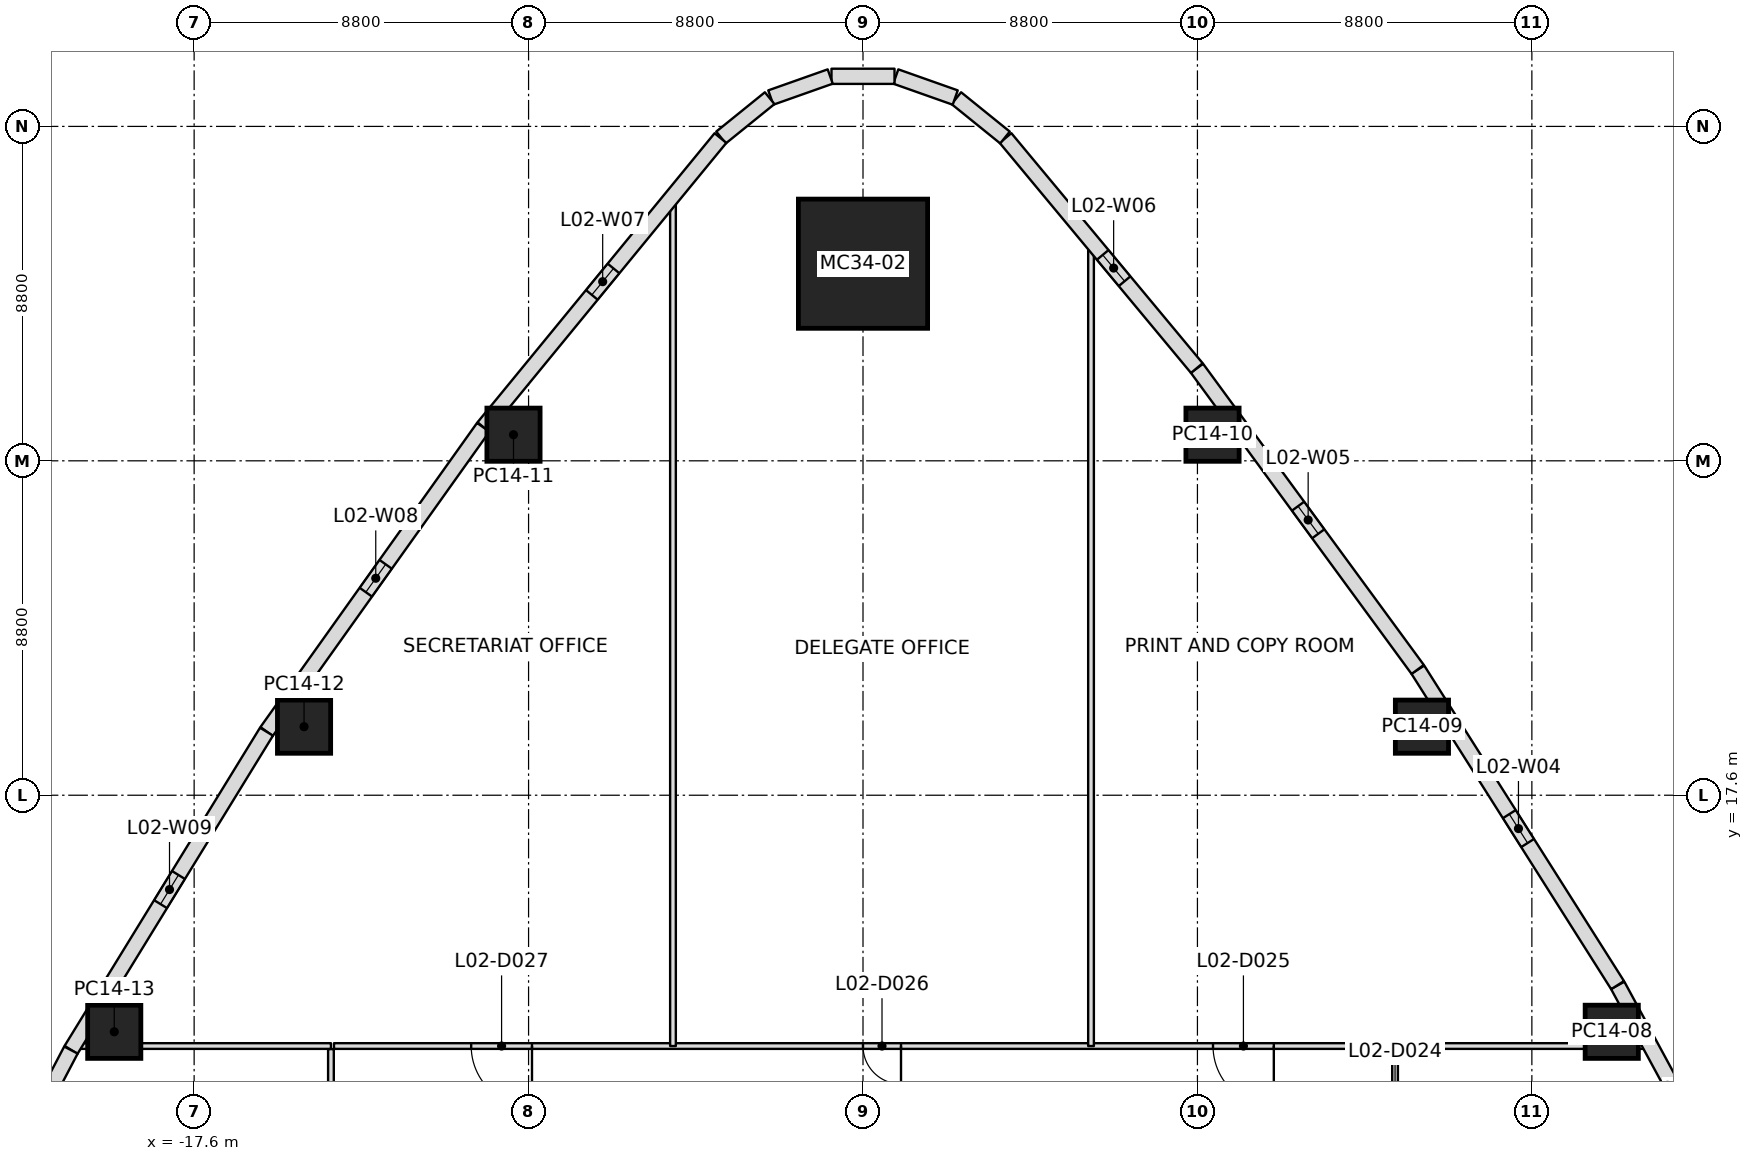
"""IFC4 building model, lengths in metres.
Left out: names, types, materials, properties, quantities, classifications, styles, units other than length and angle.
Written with IfcOpenShell. Run it as: python <this file> out.ifc"""

import sys

from ifc_helpers import new_model, si_unit, direction, frame, frame_2d, origin, origin_2d, place, context, subcontext, project, spatial, rectangle, extrude, element, fill, save


model = new_model("IFC4")
c1 = context("Model", 3, precision=1e-05, world=origin(), true_north=direction((0.0, 1.0)))
c2 = subcontext(c1, "Body", "Model", "MODEL_VIEW")
j1 = project(units=[si_unit("LENGTHUNIT", "METRE"), si_unit("PLANEANGLEUNIT", "RADIAN")], contexts=[c1])
p1 = place(None, origin())
s1 = spatial("IfcSite", under=j1, at=p1, CompositionType="ELEMENT")
p2 = place(p1, origin())
s2 = spatial("IfcBuilding", under=s1, at=p2, CompositionType="ELEMENT")
p3 = place(p2, frame((0.0, 0.0, 16.8)))
s3 = spatial("IfcBuildingStorey", under=s2, at=p3, CompositionType="ELEMENT", Elevation=16.8)
p4 = place(p3, frame((0.0, 31.587, 0.0), z_axis=(0.0, 0.0, 1.0), x_axis=(1.0, 0.0, 0.0)))
e1 = element("IfcColumn", 1, at=p4, inside=s3, PredefinedType="COLUMN", context=c2, shape_type="SweptSolid", body=[
    extrude(rectangle(XDim=3.4, YDim=3.4, at=origin_2d()), origin(), (0.0, 0.0, 1.0), 5.4),
])
for number, where, z_axis, x_axis in (
    (2, (19.702, 11.375, 0.0), (0.0, 0.0, 1.0), (-0.5, 0.866, 0.0)),
    (3, (14.708, 19.404, 0.0), (0.0, 0.0, 1.0), (-0.556, 0.831, 0.0)),
    (4, (9.197, 27.087, 0.0), (0.0, 0.0, 1.0), (-0.609, 0.793, 0.0)),
    (5, (-9.197, 27.087, 0.0), (0.0, 0.0, 1.0), (0.609, 0.793, 0.0)),
    (6, (-14.708, 19.404, 0.0), (0.0, 0.0, 1.0), (0.556, 0.831, 0.0)),
    (7, (-19.702, 11.375, 0.0), (0.0, 0.0, 1.0), (0.5, 0.866, 0.0)),
):
    element("IfcColumn", number, at=place(p3, frame(where, z_axis=z_axis, x_axis=x_axis)), inside=s3, PredefinedType="COLUMN", context=c2, shape_type="SweptSolid", body=[
        extrude(rectangle(XDim=1.4, YDim=1.4, at=origin_2d()), origin(), (0.0, 0.0, 1.0), 5.4),
    ])
p5 = place(p2, frame((0.0, 0.0, 9.0)))
s4 = spatial("IfcBuildingStorey", under=s2, at=p5, CompositionType="ELEMENT", Elevation=9.0)
p6 = place(p5, frame((16.225, 19.337, -0.06), z_axis=(0.0, 0.0, 1.0), x_axis=(0.642781408988, 0.76604964608, 0.0)))
e8 = element("IfcWall", 8, at=p6, inside=s4, PredefinedType="STANDARD", context=c2, shape_type="SweptSolid", body=[
    extrude(rectangle(XDim=8.855, YDim=0.5, at=frame_2d((4.427, 0.0))), origin(), (0.0, 0.0, 1.0), 11.06),
])
p7 = place(p6, frame((3.744, 0.0, 0.06)))
e9 = element("IfcOpeningElement", 9, at=p7, cuts=e8, PredefinedType="OPENING", context=c2, shape_type="SweptSolid", body=[
    extrude(rectangle(XDim=2.4, YDim=3.0, at=frame_2d((1.2, 1.5))), frame((0.0, 0.25, 0.0), z_axis=(0.0, -1.0, 0.0), x_axis=(1.0, 0.0, 0.0)), (0.0, 0.0, 1.0), 0.5),
])
p8 = place(p5, frame((-17.455, 17.455, -0.06), z_axis=(0.0, 0.0, 1.0), x_axis=(-0.707106781187, 0.707106781187, 0.0)))
e10 = element("IfcWall", 10, at=p8, inside=s4, PredefinedType="STANDARD", context=c2, shape_type="SweptSolid", body=[
    extrude(rectangle(XDim=8.704, YDim=0.5, at=frame_2d((4.352, 0.0))), origin(), (0.0, 0.0, 1.0), 10.06),
])
p9 = place(p8, frame((3.656, 0.0, 0.06)))
e11 = element("IfcOpeningElement", 11, at=p9, cuts=e10, PredefinedType="OPENING", context=c2, shape_type="SweptSolid", body=[
    extrude(rectangle(XDim=2.4, YDim=3.0, at=frame_2d((1.2, 1.5))), frame((0.0, 0.25, 0.0), z_axis=(0.0, -1.0, 0.0), x_axis=(1.0, 0.0, 0.0)), (0.0, 0.0, 1.0), 0.5),
])
p10 = place(p3, frame((19.859, 12.597, 0.0), z_axis=(0.0, 0.0, 1.0), x_axis=(0.476254331716, -0.879307575039, 0.0)))
e12 = element("IfcWall", 12, at=p10, inside=s3, PredefinedType="STANDARD", context=c2, shape_type="SweptSolid", body=[
    extrude(rectangle(XDim=9.825, YDim=0.4, at=frame_2d((4.913, 0.0))), origin(), (0.0, 0.0, 1.0), 4.5),
])
p11 = place(p10, frame((4.5, 0.0, 1.2)))
e13 = element("IfcOpeningElement", 13, at=p11, cuts=e12, PredefinedType="OPENING", context=c2, shape_type="SweptSolid", body=[
    extrude(rectangle(XDim=0.9, YDim=2.4, at=frame_2d((0.45, 1.2))), frame((0.0, 0.2, 0.0), z_axis=(0.0, -1.0, 0.0), x_axis=(1.0, 0.0, 0.0)), (0.0, 0.0, 1.0), 0.4),
])
p12 = place(p3, frame((14.599, 20.905, 0.0), z_axis=(0.0, 0.0, 1.0), x_axis=(0.534912566476, -0.844907418731, 0.0)))
e14 = element("IfcWall", 14, at=p12, inside=s3, PredefinedType="STANDARD", context=c2, shape_type="SweptSolid", body=[
    extrude(rectangle(XDim=9.826, YDim=0.4, at=frame_2d((4.913, 0.0))), origin(), (0.0, 0.0, 1.0), 4.5),
])
p13 = place(p12, frame((4.5, 0.0, 1.2)))
e15 = element("IfcOpeningElement", 15, at=p13, cuts=e14, PredefinedType="OPENING", context=c2, shape_type="SweptSolid", body=[
    extrude(rectangle(XDim=0.9, YDim=2.4, at=frame_2d((0.45, 1.2))), frame((0.0, 0.2, 0.0), z_axis=(0.0, -1.0, 0.0), x_axis=(1.0, 0.0, 0.0)), (0.0, 0.0, 1.0), 0.4),
])
p14 = place(p3, frame((8.788, 28.836, 0.0), z_axis=(0.0, 0.0, 1.0), x_axis=(0.591085715329, -0.806608750966, 0.0)))
e16 = element("IfcWall", 16, at=p14, inside=s3, PredefinedType="STANDARD", context=c2, shape_type="SweptSolid", body=[
    extrude(rectangle(XDim=9.826, YDim=0.4, at=frame_2d((4.913, 0.0))), origin(), (0.0, 0.0, 1.0), 4.5),
])
p15 = place(p14, frame((4.5, 0.0, 1.2)))
e17 = element("IfcOpeningElement", 17, at=p15, cuts=e16, PredefinedType="OPENING", context=c2, shape_type="SweptSolid", body=[
    extrude(rectangle(XDim=0.9, YDim=2.4, at=frame_2d((0.45, 1.2))), frame((0.0, 0.2, 0.0), z_axis=(0.0, -1.0, 0.0), x_axis=(1.0, 0.0, 0.0)), (0.0, 0.0, 1.0), 0.4),
])
p16 = place(p3, frame((3.75, 34.894, 0.0), z_axis=(0.0, 0.0, 1.0), x_axis=(0.639357483443, -0.768909623015, 0.0)))
e18 = element("IfcWall", 18, at=p16, inside=s3, PredefinedType="STANDARD", context=c2, shape_type="SweptSolid", body=[
    extrude(rectangle(XDim=7.874, YDim=0.4, at=frame_2d((3.937, 0.0))), origin(), (0.0, 0.0, 1.0), 4.5),
])
p17 = place(p16, frame((4.0, 0.0, 1.2)))
e19 = element("IfcOpeningElement", 19, at=p17, cuts=e18, PredefinedType="OPENING", context=c2, shape_type="SweptSolid", body=[
    extrude(rectangle(XDim=0.9, YDim=2.4, at=frame_2d((0.45, 1.2))), frame((0.0, 0.2, 0.0), z_axis=(0.0, -1.0, 0.0), x_axis=(1.0, 0.0, 0.0)), (0.0, 0.0, 1.0), 0.4),
])
p18 = place(p3, frame((2.456, 35.943, 0.0), z_axis=(0.0, 0.0, 1.0), x_axis=(0.77769018818, -0.628647732207, 0.0)))
e20 = element("IfcWall", 20, at=p18, inside=s3, PredefinedType="STANDARD", context=c2, shape_type="SweptSolid", body=[
    extrude(rectangle(XDim=1.646, YDim=0.4, at=frame_2d((0.823, 0.0))), origin(), (0.0, 0.0, 1.0), 4.5),
])
for number, where, z_axis, x_axis in (
    (21, (0.863, 36.513, 0.0), (0.0, 0.0, 1.0), (0.943, -0.333, 0.0)),
    (22, (-0.829, 36.519, 0.0), (0.0, 0.0, 1.0), (1.0, 0.0, 0.0)),
    (23, (-2.427, 35.96, 0.0), (0.0, 0.0, 1.0), (0.943, 0.333, 0.0)),
):
    element("IfcWall", number, at=place(p3, frame(where, z_axis=z_axis, x_axis=x_axis)), inside=s3, PredefinedType="STANDARD", context=c2, shape_type="SweptSolid", body=[
        extrude(rectangle(XDim=1.659, YDim=0.4, at=frame_2d((0.829, 0.0))), origin(), (0.0, 0.0, 1.0), 4.5),
    ])
p19 = place(p3, frame((-3.736, 34.908, 0.0), z_axis=(0.0, 0.0, 1.0), x_axis=(0.77769018818, 0.628647732207, 0.0)))
e24 = element("IfcWall", 24, at=p19, inside=s3, PredefinedType="STANDARD", context=c2, shape_type="SweptSolid", body=[
    extrude(rectangle(XDim=1.646, YDim=0.4, at=frame_2d((0.823, 0.0))), origin(), (0.0, 0.0, 1.0), 4.5),
])
p20 = place(p3, frame((-9.989, 27.287, 0.0), z_axis=(0.0, 0.0, 1.0), x_axis=(0.634103626557, 0.773248078424, 0.0)))
e25 = element("IfcWall", 25, at=p20, inside=s3, PredefinedType="STANDARD", context=c2, shape_type="SweptSolid", body=[
    extrude(rectangle(XDim=9.838, YDim=0.4, at=frame_2d((4.919, 0.0))), origin(), (0.0, 0.0, 1.0), 4.5),
])
p21 = place(p20, frame((4.5, 0.0, 1.2)))
e26 = element("IfcOpeningElement", 26, at=p21, cuts=e25, PredefinedType="OPENING", context=c2, shape_type="SweptSolid", body=[
    extrude(rectangle(XDim=0.9, YDim=2.4, at=frame_2d((0.45, 1.2))), frame((0.0, 0.2, 0.0), z_axis=(0.0, -1.0, 0.0), x_axis=(1.0, 0.0, 0.0)), (0.0, 0.0, 1.0), 0.4),
])
p22 = place(p3, frame((-15.692, 19.278, 0.0), z_axis=(0.0, 0.0, 1.0), x_axis=(0.580062373049, 0.814572061498, 0.0)))
e27 = element("IfcWall", 27, at=p22, inside=s3, PredefinedType="STANDARD", context=c2, shape_type="SweptSolid", body=[
    extrude(rectangle(XDim=9.826, YDim=0.4, at=frame_2d((4.913, 0.0))), origin(), (0.0, 0.0, 1.0), 4.5),
])
p23 = place(p22, frame((4.5, 0.0, 1.2)))
e28 = element("IfcOpeningElement", 28, at=p23, cuts=e27, PredefinedType="OPENING", context=c2, shape_type="SweptSolid", body=[
    extrude(rectangle(XDim=0.9, YDim=2.4, at=frame_2d((0.45, 1.2))), frame((0.0, 0.2, 0.0), z_axis=(0.0, -1.0, 0.0), x_axis=(1.0, 0.0, 0.0)), (0.0, 0.0, 1.0), 0.4),
])
p24 = place(p3, frame((-20.839, 10.9, 0.0), z_axis=(0.0, 0.0, 1.0), x_axis=(0.523369396098, 0.85210590611, 0.0)))
e29 = element("IfcWall", 29, at=p24, inside=s3, PredefinedType="STANDARD", context=c2, shape_type="SweptSolid", body=[
    extrude(rectangle(XDim=9.825, YDim=0.4, at=frame_2d((4.913, 0.0))), origin(), (0.0, 0.0, 1.0), 4.5),
])
p25 = place(p24, frame((4.5, 0.0, 1.2)))
e30 = element("IfcOpeningElement", 30, at=p25, cuts=e29, PredefinedType="OPENING", context=c2, shape_type="SweptSolid", body=[
    extrude(rectangle(XDim=0.9, YDim=2.4, at=frame_2d((0.45, 1.2))), frame((0.0, 0.2, 0.0), z_axis=(0.0, -1.0, 0.0), x_axis=(1.0, 0.0, 0.0)), (0.0, 0.0, 1.0), 0.4),
])
p26 = place(p3, frame((-25.404, 2.191, 0.0), z_axis=(0.0, 0.0, 1.0), x_axis=(0.464246519602, 0.885706028566, 0.0)))
e31 = element("IfcWall", 31, at=p26, inside=s3, PredefinedType="STANDARD", context=c2, shape_type="SweptSolid", body=[
    extrude(rectangle(XDim=9.826, YDim=0.4, at=frame_2d((4.913, 0.0))), origin(), (0.0, 0.0, 1.0), 4.5),
])
p27 = place(p26, frame((4.5, 0.0, 1.2)))
e32 = element("IfcOpeningElement", 32, at=p27, cuts=e31, PredefinedType="OPENING", context=c2, shape_type="SweptSolid", body=[
    extrude(rectangle(XDim=0.9, YDim=2.4, at=frame_2d((0.45, 1.2))), frame((0.0, 0.2, 0.0), z_axis=(0.0, -1.0, 0.0), x_axis=(1.0, 0.0, 0.0)), (0.0, 0.0, 1.0), 0.4),
])
p28 = place(p3, frame((-14.0, 11.0, 0.0), z_axis=(0.0, 0.0, 1.0), x_axis=(-1.0, 0.0, 0.0)))
e33 = element("IfcWall", 33, at=p28, inside=s3, PredefinedType="PARTITIONING", context=c2, shape_type="SweptSolid", body=[
    extrude(rectangle(XDim=6.642, YDim=0.15, at=frame_2d((3.321, 0.0))), origin(), (0.0, 0.0, 1.0), 4.75),
])
p29 = place(p3, frame((-5.0, 11.0, 0.0), z_axis=(0.0, 0.0, 1.0), x_axis=(0.0, 1.0, 0.0)))
e34 = element("IfcWall", 34, at=p29, inside=s3, PredefinedType="PARTITIONING", context=c2, shape_type="SweptSolid", body=[
    extrude(rectangle(XDim=22.267, YDim=0.15, at=frame_2d((11.134, 0.0))), origin(), (0.0, 0.0, 1.0), 4.534),
])
p30 = place(p3, frame((6.0, 11.0, 0.0), z_axis=(0.0, 0.0, 1.0), x_axis=(0.0, 1.0, 0.0)))
e35 = element("IfcWall", 35, at=p30, inside=s3, PredefinedType="PARTITIONING", context=c2, shape_type="SweptSolid", body=[
    extrude(rectangle(XDim=21.081, YDim=0.15, at=frame_2d((10.541, 0.0))), origin(), (0.0, 0.0, 1.0), 4.534),
])
p31 = place(p3, frame((14.0, 11.0, 0.0), z_axis=(0.0, 0.0, 1.0), x_axis=(1.0, 0.0, 0.0)))
e36 = element("IfcWall", 36, at=p31, inside=s3, PredefinedType="PARTITIONING", context=c2, shape_type="SweptSolid", body=[
    extrude(rectangle(XDim=6.642, YDim=0.15, at=frame_2d((3.321, 0.0))), origin(), (0.0, 0.0, 1.0), 4.75),
])
p32 = place(p3, frame((-14.0, 10.92, 0.0), z_axis=(0.0, 0.0, 1.0), x_axis=(0.0, -1.0, 0.0)))
e37 = element("IfcWall", 37, at=p32, inside=s3, PredefinedType="PARTITIONING", context=c2, shape_type="SweptSolid", body=[
    extrude(rectangle(XDim=21.84, YDim=0.15, at=frame_2d((10.92, 0.0))), origin(), (0.0, 0.0, 1.0), 4.247),
])
p33 = place(p32, frame((5.92, 0.0, 0.0)))
e38 = element("IfcOpeningElement", 38, at=p33, cuts=e37, PredefinedType="OPENING", context=c2, shape_type="SweptSolid", body=[
    extrude(rectangle(XDim=1.0, YDim=2.1, at=frame_2d((0.5, 1.05))), frame((0.0, 0.075, 0.0), z_axis=(0.0, -1.0, 0.0), x_axis=(1.0, 0.0, 0.0)), (0.0, 0.0, 1.0), 0.15),
])
p34 = place(p32, frame((16.93, 0.0, 0.0)))
e39 = element("IfcOpeningElement", 39, at=p34, cuts=e37, PredefinedType="OPENING", context=c2, shape_type="SweptSolid", body=[
    extrude(rectangle(XDim=1.0, YDim=2.1, at=frame_2d((0.5, 1.05))), frame((0.0, 0.075, 0.0), z_axis=(0.0, -1.0, 0.0), x_axis=(1.0, 0.0, 0.0)), (0.0, 0.0, 1.0), 0.15),
])
p35 = place(p3, frame((13.92, 11.0, 0.0), z_axis=(0.0, 0.0, 1.0), x_axis=(-1.0, 0.0, 0.0)))
e40 = element("IfcWall", 40, at=p35, inside=s3, PredefinedType="PARTITIONING", context=c2, shape_type="SweptSolid", body=[
    extrude(rectangle(XDim=27.84, YDim=0.15, at=frame_2d((13.92, 0.0))), origin(), (0.0, 0.0, 1.0), 4.247),
])
p36 = place(p35, frame((3.11, 0.0, 0.0)))
e41 = element("IfcOpeningElement", 41, at=p36, cuts=e40, PredefinedType="OPENING", context=c2, shape_type="SweptSolid", body=[
    extrude(rectangle(XDim=1.6, YDim=2.1, at=frame_2d((0.8, 1.05))), frame((0.0, 0.075, 0.0), z_axis=(0.0, -1.0, 0.0), x_axis=(1.0, 0.0, 0.0)), (0.0, 0.0, 1.0), 0.15),
])
p37 = place(p35, frame((12.92, 0.0, 0.0)))
e42 = element("IfcOpeningElement", 42, at=p37, cuts=e40, PredefinedType="OPENING", context=c2, shape_type="SweptSolid", body=[
    extrude(rectangle(XDim=1.0, YDim=2.1, at=frame_2d((0.5, 1.05))), frame((0.0, 0.075, 0.0), z_axis=(0.0, -1.0, 0.0), x_axis=(1.0, 0.0, 0.0)), (0.0, 0.0, 1.0), 0.15),
])
p38 = place(p35, frame((22.63, 0.0, 0.0)))
e43 = element("IfcOpeningElement", 43, at=p38, cuts=e40, PredefinedType="OPENING", context=c2, shape_type="SweptSolid", body=[
    extrude(rectangle(XDim=1.6, YDim=2.1, at=frame_2d((0.8, 1.05))), frame((0.0, 0.075, 0.0), z_axis=(0.0, -1.0, 0.0), x_axis=(1.0, 0.0, 0.0)), (0.0, 0.0, 1.0), 0.15),
])
p39 = place(p3, frame((14.0, -10.92, 0.0), z_axis=(0.0, 0.0, 1.0), x_axis=(0.0, 1.0, 0.0)))
e44 = element("IfcWall", 44, at=p39, inside=s3, PredefinedType="PARTITIONING", context=c2, shape_type="SweptSolid", body=[
    extrude(rectangle(XDim=21.84, YDim=0.15, at=frame_2d((10.92, 0.0))), origin(), (0.0, 0.0, 1.0), 4.247),
])
p40 = place(p39, frame((14.52, 0.0, 0.0)))
e45 = element("IfcOpeningElement", 45, at=p40, cuts=e44, PredefinedType="OPENING", context=c2, shape_type="SweptSolid", body=[
    extrude(rectangle(XDim=1.0, YDim=2.1, at=frame_2d((0.5, 1.05))), frame((0.0, 0.075, 0.0), z_axis=(0.0, -1.0, 0.0), x_axis=(1.0, 0.0, 0.0)), (0.0, 0.0, 1.0), 0.15),
])
p41 = place(p39, frame((19.07, 0.0, 0.0)))
e46 = element("IfcOpeningElement", 46, at=p41, cuts=e44, PredefinedType="OPENING", context=c2, shape_type="SweptSolid", body=[
    extrude(rectangle(XDim=1.0, YDim=2.1, at=frame_2d((0.5, 1.05))), frame((0.0, 0.075, 0.0), z_axis=(0.0, -1.0, 0.0), x_axis=(1.0, 0.0, 0.0)), (0.0, 0.0, 1.0), 0.15),
])
p42 = place(p39, frame((0.41, 0.0, 0.0)))
e47 = element("IfcOpeningElement", 47, at=p42, cuts=e44, PredefinedType="OPENING", context=c2, shape_type="SweptSolid", body=[
    extrude(rectangle(XDim=1.0, YDim=2.1, at=frame_2d((0.5, 1.05))), frame((0.0, 0.075, 0.0), z_axis=(0.0, -1.0, 0.0), x_axis=(1.0, 0.0, 0.0)), (0.0, 0.0, 1.0), 0.15),
])
p43 = place(p39, frame((6.92, 0.0, 0.0)))
e48 = element("IfcOpeningElement", 48, at=p43, cuts=e44, PredefinedType="OPENING", context=c2, shape_type="SweptSolid", body=[
    extrude(rectangle(XDim=1.0, YDim=2.1, at=frame_2d((0.5, 1.05))), frame((0.0, 0.075, 0.0), z_axis=(0.0, -1.0, 0.0), x_axis=(1.0, 0.0, 0.0)), (0.0, 0.0, 1.0), 0.15),
])
p44 = place(p13, origin())
e49 = element("IfcWindow", 49, at=p44, inside=s3, PartitioningType="SINGLE_PANEL", PredefinedType="WINDOW", context=c2, shape_type="SweptSolid", body=[
    extrude(rectangle(XDim=0.9, YDim=2.4, at=frame_2d((0.45, 1.2))), frame((0.0, 0.03, 0.0), z_axis=(0.0, -1.0, 0.0), x_axis=(1.0, 0.0, 0.0)), (0.0, 0.0, 1.0), 0.06),
])
fill(e15, e49)
p45 = place(p15, origin())
e50 = element("IfcWindow", 50, at=p45, inside=s3, PartitioningType="SINGLE_PANEL", PredefinedType="WINDOW", context=c2, shape_type="SweptSolid", body=[
    extrude(rectangle(XDim=0.9, YDim=2.4, at=frame_2d((0.45, 1.2))), frame((0.0, 0.03, 0.0), z_axis=(0.0, -1.0, 0.0), x_axis=(1.0, 0.0, 0.0)), (0.0, 0.0, 1.0), 0.06),
])
fill(e17, e50)
p46 = place(p17, origin())
e51 = element("IfcWindow", 51, at=p46, inside=s3, PartitioningType="SINGLE_PANEL", PredefinedType="WINDOW", context=c2, shape_type="SweptSolid", body=[
    extrude(rectangle(XDim=0.9, YDim=2.4, at=frame_2d((0.45, 1.2))), frame((0.0, 0.03, 0.0), z_axis=(0.0, -1.0, 0.0), x_axis=(1.0, 0.0, 0.0)), (0.0, 0.0, 1.0), 0.06),
])
fill(e19, e51)
p47 = place(p21, origin())
e52 = element("IfcWindow", 52, at=p47, inside=s3, PartitioningType="SINGLE_PANEL", PredefinedType="WINDOW", context=c2, shape_type="SweptSolid", body=[
    extrude(rectangle(XDim=0.9, YDim=2.4, at=frame_2d((0.45, 1.2))), frame((0.0, 0.03, 0.0), z_axis=(0.0, -1.0, 0.0), x_axis=(1.0, 0.0, 0.0)), (0.0, 0.0, 1.0), 0.06),
])
fill(e26, e52)
p48 = place(p23, origin())
e53 = element("IfcWindow", 53, at=p48, inside=s3, PartitioningType="SINGLE_PANEL", PredefinedType="WINDOW", context=c2, shape_type="SweptSolid", body=[
    extrude(rectangle(XDim=0.9, YDim=2.4, at=frame_2d((0.45, 1.2))), frame((0.0, 0.03, 0.0), z_axis=(0.0, -1.0, 0.0), x_axis=(1.0, 0.0, 0.0)), (0.0, 0.0, 1.0), 0.06),
])
fill(e28, e53)
p49 = place(p25, origin())
e54 = element("IfcWindow", 54, at=p49, inside=s3, PartitioningType="SINGLE_PANEL", PredefinedType="WINDOW", context=c2, shape_type="SweptSolid", body=[
    extrude(rectangle(XDim=0.9, YDim=2.4, at=frame_2d((0.45, 1.2))), frame((0.0, 0.03, 0.0), z_axis=(0.0, -1.0, 0.0), x_axis=(1.0, 0.0, 0.0)), (0.0, 0.0, 1.0), 0.06),
])
fill(e30, e54)
p50 = place(p36, origin())
e55 = element("IfcDoor", 55, at=p50, inside=s3, OperationType="DOUBLE_DOOR_SINGLE_SWING", PredefinedType="DOOR", context=c2, shape_type="SweptSolid", body=[
    extrude(rectangle(XDim=1.6, YDim=2.1, at=frame_2d((0.8, 1.05))), frame((0.0, 0.025, 0.0), z_axis=(0.0, -1.0, 0.0), x_axis=(1.0, 0.0, 0.0)), (0.0, 0.0, 1.0), 0.05),
])
fill(e41, e55)
p51 = place(p37, origin())
e56 = element("IfcDoor", 56, at=p51, inside=s3, OperationType="SINGLE_SWING_LEFT", PredefinedType="DOOR", context=c2, shape_type="SweptSolid", body=[
    extrude(rectangle(XDim=1.0, YDim=2.1, at=frame_2d((0.5, 1.05))), frame((0.0, 0.025, 0.0), z_axis=(0.0, -1.0, 0.0), x_axis=(1.0, 0.0, 0.0)), (0.0, 0.0, 1.0), 0.05),
])
fill(e42, e56)
p52 = place(p38, origin())
e57 = element("IfcDoor", 57, at=p52, inside=s3, OperationType="DOUBLE_DOOR_SINGLE_SWING", PredefinedType="DOOR", context=c2, shape_type="SweptSolid", body=[
    extrude(rectangle(XDim=1.6, YDim=2.1, at=frame_2d((0.8, 1.05))), frame((0.0, 0.025, 0.0), z_axis=(0.0, -1.0, 0.0), x_axis=(1.0, 0.0, 0.0)), (0.0, 0.0, 1.0), 0.05),
])
fill(e43, e57)
save(model, sys.argv[1])
